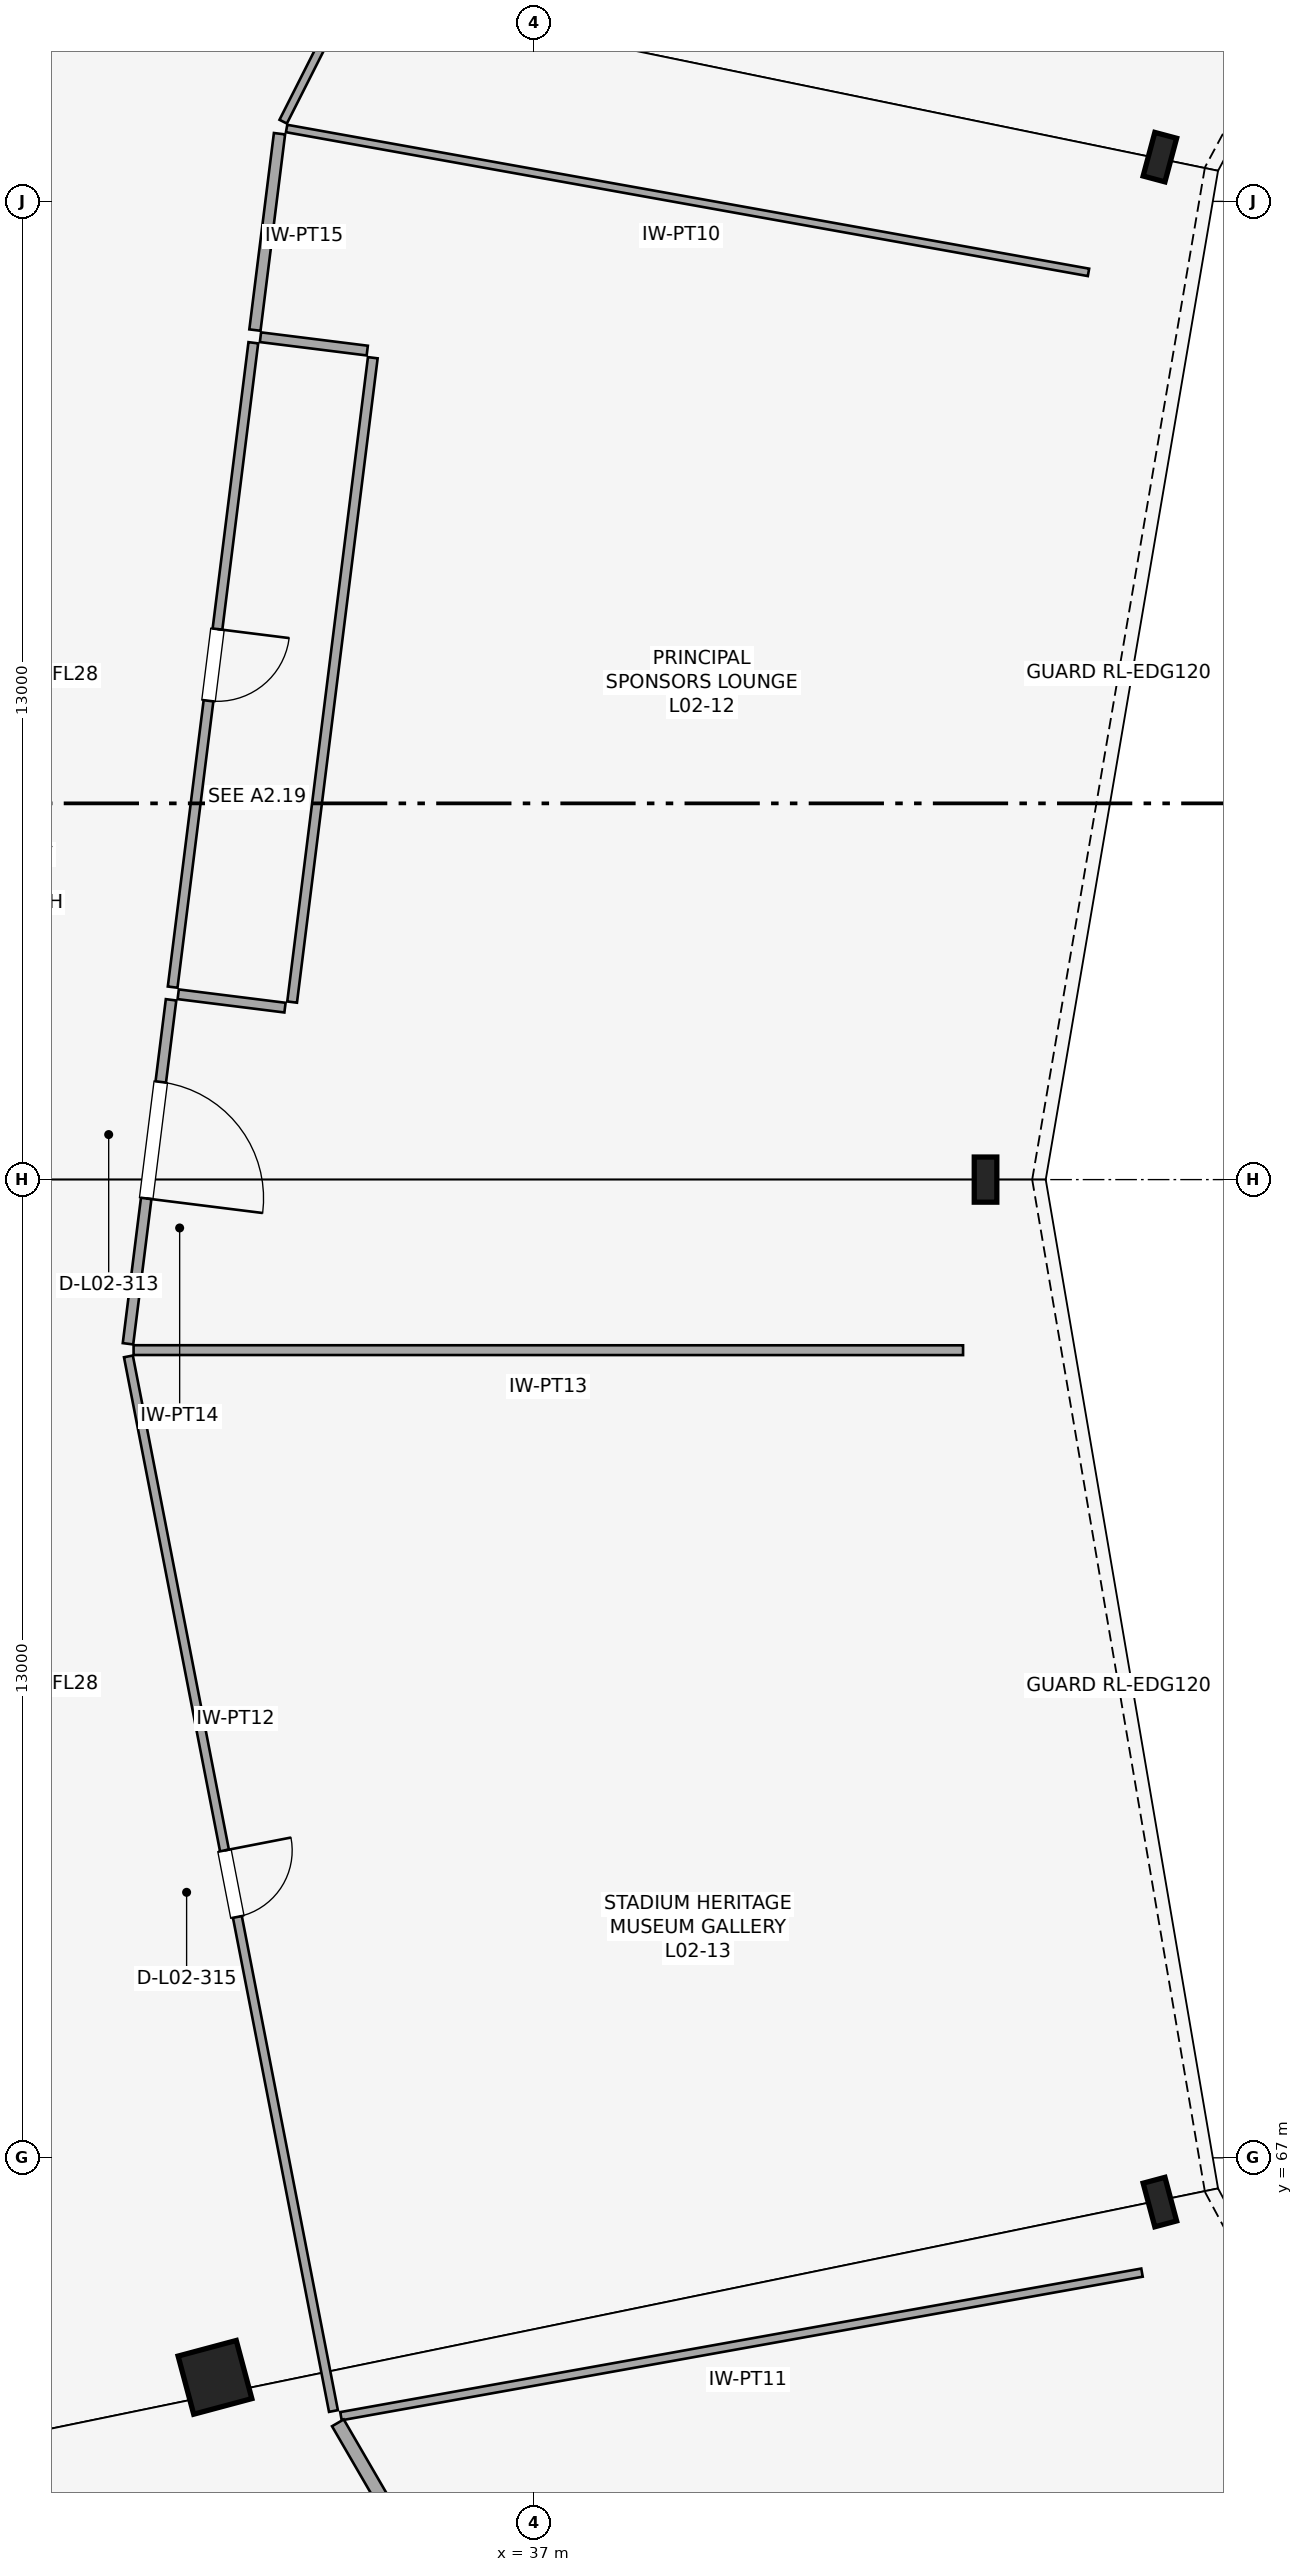
"""IFC4 building model, lengths in metres.
Left out: names, types, materials, properties, quantities, classifications, styles, units other than length and angle.
Written with IfcOpenShell. Run it as: python <this file> out.ifc"""

import sys

from ifc_helpers import new_model, si_unit, direction, frame, frame_2d, origin, origin_2d, place, context, subcontext, project, spatial, rectangle, i_section, extrude, element, fill, save


model = new_model("IFC4")
c1 = context("Model", 3, precision=1e-05, world=origin(), true_north=direction((0.0, 1.0)))
c2 = subcontext(c1, "Body", "Model", "MODEL_VIEW")
j1 = project(units=[si_unit("LENGTHUNIT", "METRE"), si_unit("PLANEANGLEUNIT", "RADIAN")], contexts=[c1])
p1 = place(None, origin())
s1 = spatial("IfcSite", under=j1, at=p1, CompositionType="ELEMENT")
p2 = place(p1, origin())
s2 = spatial("IfcBuilding", under=s1, at=p2, CompositionType="ELEMENT")
p3 = place(p2, frame((0.0, 0.0, 10.6)))
s3 = spatial("IfcBuildingStorey", under=s2, at=p3, CompositionType="ELEMENT", Elevation=10.6)
for number, where, z_axis, x_axis in (
    (1, (45.317, 93.588, 0.0), (0.0, 0.0, 1.0), (-0.966, 0.259, 0.0)),
    (2, (43.0, 80.0, 0.0), (0.0, 0.0, 1.0), (-1.0, 0.0, 0.0)),
    (3, (45.317, 66.412, 0.0), (0.0, 0.0, 1.0), (-0.966, -0.259, 0.0)),
):
    element("IfcColumn", number, at=place(p3, frame(where, z_axis=z_axis, x_axis=x_axis)), inside=s3, PredefinedType="COLUMN", context=c2, shape_type="SweptSolid", body=[
        extrude(i_section(OverallWidth=0.3, OverallDepth=0.6, WebThickness=0.015, FlangeThickness=0.03, FilletRadius=0.027, at=origin_2d()), origin(), (0.0, 0.0, 1.0), 5.0),
    ])
p4 = place(p3, frame((32.76, 64.083, 0.0), z_axis=(0.0, 0.0, 1.0), x_axis=(-0.965925826289, -0.258819045103, 0.0)))
e4 = element("IfcColumn", 4, at=p4, inside=s3, PredefinedType="COLUMN", context=c2, shape_type="SweptSolid", body=[
    extrude(rectangle(XDim=0.8, YDim=0.8, at=origin_2d()), origin(), (0.0, 0.0, 1.0), 5.0),
])
p5 = place(p3, frame((41.445, 109.428, 0.0), z_axis=(0.0, 0.0, 1.0), x_axis=(-0.451596331637, -0.892222367603, 0.0)))
e5 = element("IfcWall", 5, at=p5, inside=s3, PredefinedType="PARTITIONING", context=c2, shape_type="SweptSolid", body=[
    extrude(rectangle(XDim=17.225, YDim=0.11, at=frame_2d((8.613, 0.0))), origin(), (0.0, 0.0, 1.0), 3.47),
])
p6 = place(p5, frame((7.703, 0.0, 0.0)))
e6 = element("IfcOpeningElement", 6, at=p6, cuts=e5, PredefinedType="OPENING", context=c2, shape_type="SweptSolid", body=[
    extrude(rectangle(XDim=1.82, YDim=2.1, at=frame_2d((0.91, 1.05))), frame((0.0, 0.065, 0.0), z_axis=(0.0, -1.0, 0.0), x_axis=(1.0, 0.0, 0.0)), (0.0, 0.0, 1.0), 0.13),
])
p7 = place(p3, frame((44.368, 92.057, 0.0), z_axis=(0.0, 0.0, 1.0), x_axis=(-0.984280053561, 0.176614767675, 0.0)))
e7 = element("IfcWall", 7, at=p7, inside=s3, PredefinedType="PARTITIONING", context=c2, shape_type="SweptSolid", body=[
    extrude(rectangle(XDim=10.826, YDim=0.1, at=frame_2d((5.413, 0.0))), origin(), (0.0, 0.0, 1.0), 3.47),
])
p8 = place(p3, frame((33.27, 91.121, 0.0), z_axis=(0.0, 0.0, 1.0), x_axis=(-0.124247119987, -0.992251305454, 0.0)))
e8 = element("IfcWall", 8, at=p8, inside=s3, PredefinedType="PARTITIONING", context=c2, shape_type="SweptSolid", body=[
    extrude(rectangle(XDim=8.63, YDim=0.13, at=frame_2d((4.315, 0.0))), origin(), (0.0, 0.0, 1.0), 3.47),
])
p9 = place(p8, frame((3.835, 0.0, 0.0)))
e9 = element("IfcOpeningElement", 9, at=p9, cuts=e8, PredefinedType="OPENING", context=c2, shape_type="SweptSolid", body=[
    extrude(rectangle(XDim=0.96, YDim=2.24, at=frame_2d((0.48, 1.12))), frame((0.0, 0.075, 0.0), z_axis=(0.0, -1.0, 0.0), x_axis=(1.0, 0.0, 0.0)), (0.0, 0.0, 1.0), 0.15),
])
p10 = place(p3, frame((34.857, 90.922, 0.0), z_axis=(0.0, 0.0, 1.0), x_axis=(-0.124247119987, -0.992251305454, 0.0)))
e10 = element("IfcWall", 10, at=p10, inside=s3, PredefinedType="PARTITIONING", context=c2, shape_type="SweptSolid", body=[
    extrude(rectangle(XDim=8.63, YDim=0.13, at=frame_2d((4.315, 0.0))), origin(), (0.0, 0.0, 1.0), 3.47),
])
p11 = place(p3, frame((33.365, 91.195, 0.0), z_axis=(0.0, 0.0, 1.0), x_axis=(0.992248962989, -0.124265825745, 0.0)))
e11 = element("IfcWall", 11, at=p11, inside=s3, PredefinedType="PARTITIONING", context=c2, shape_type="SweptSolid", body=[
    extrude(rectangle(XDim=1.43, YDim=0.13, at=frame_2d((0.715, 0.0))), origin(), (0.0, 0.0, 1.0), 3.47),
])
p12 = place(p3, frame((32.271, 82.463, 0.0), z_axis=(0.0, 0.0, 1.0), x_axis=(0.992267366855, -0.124118784533, 0.0)))
e12 = element("IfcWall", 12, at=p12, inside=s3, PredefinedType="PARTITIONING", context=c2, shape_type="SweptSolid", body=[
    extrude(rectangle(XDim=1.43, YDim=0.13, at=frame_2d((0.715, 0.0))), origin(), (0.0, 0.0, 1.0), 3.47),
])
p13 = place(p3, frame((33.618, 93.899, 0.0), z_axis=(0.0, 0.0, 1.0), x_axis=(-0.124206110608, -0.992256439681, 0.0)))
e13 = element("IfcWall", 13, at=p13, inside=s3, PredefinedType="PARTITIONING", context=c2, shape_type="SweptSolid", body=[
    extrude(rectangle(XDim=2.63, YDim=0.15, at=frame_2d((1.315, 0.0))), origin(), (0.0, 0.0, 1.0), 3.47),
])
p14 = place(p3, frame((32.177, 82.389, 0.0), z_axis=(0.0, 0.0, 1.0), x_axis=(-0.124269532661, -0.99224849874, 0.0)))
e14 = element("IfcWall", 14, at=p14, inside=s3, PredefinedType="PARTITIONING", context=c2, shape_type="SweptSolid", body=[
    extrude(rectangle(XDim=4.607, YDim=0.14, at=frame_2d((2.303, 0.0))), origin(), (0.0, 0.0, 1.0), 3.47),
])
p15 = place(p14, frame((1.1, 0.0, 0.0)))
e15 = element("IfcOpeningElement", 15, at=p15, cuts=e14, PredefinedType="OPENING", context=c2, shape_type="SweptSolid", body=[
    extrude(rectangle(XDim=1.56, YDim=2.24, at=frame_2d((0.78, 1.12))), frame((0.0, 0.08, 0.0), z_axis=(0.0, -1.0, 0.0), x_axis=(1.0, 0.0, 0.0)), (0.0, 0.0, 1.0), 0.16),
])
p16 = place(p3, frame((42.701, 77.733, 0.0), z_axis=(0.0, 0.0, 1.0), x_axis=(-0.999999993868, 0.000110741971, 0.0)))
e16 = element("IfcWall", 16, at=p16, inside=s3, PredefinedType="PARTITIONING", context=c2, shape_type="SweptSolid", body=[
    extrude(rectangle(XDim=11.023, YDim=0.13, at=frame_2d((5.511, 0.0))), origin(), (0.0, 0.0, 1.0), 3.47),
])
p17 = place(p3, frame((31.61, 77.65, 0.0), z_axis=(0.0, 0.0, 1.0), x_axis=(0.190845402178, -0.981620105982, 0.0)))
e17 = element("IfcWall", 17, at=p17, inside=s3, PredefinedType="PARTITIONING", context=c2, shape_type="SweptSolid", body=[
    extrude(rectangle(XDim=14.278, YDim=0.12, at=frame_2d((7.139, 0.0))), origin(), (0.0, 0.0, 1.0), 3.47),
])
p18 = place(p17, frame((6.689, 0.0, 0.0)))
e18 = element("IfcOpeningElement", 18, at=p18, cuts=e17, PredefinedType="OPENING", context=c2, shape_type="SweptSolid", body=[
    extrude(rectangle(XDim=0.9, YDim=2.1, at=frame_2d((0.45, 1.05))), frame((0.0, 0.07, 0.0), z_axis=(0.0, -1.0, 0.0), x_axis=(1.0, 0.0, 0.0)), (0.0, 0.0, 1.0), 0.14),
])
p19 = place(p3, frame((45.079, 65.474, 0.0), z_axis=(0.0, 0.0, 1.0), x_axis=(-0.984317575192, -0.176405530436, 0.0)))
e19 = element("IfcWall", 19, at=p19, inside=s3, PredefinedType="PARTITIONING", context=c2, shape_type="SweptSolid", body=[
    extrude(rectangle(XDim=10.814, YDim=0.11, at=frame_2d((5.407, 0.0))), origin(), (0.0, 0.0, 1.0), 3.47),
])
p20 = place(p3, frame((34.393, 63.478, 0.0), z_axis=(0.0, 0.0, 1.0), x_axis=(0.501999042339, -0.864868175788, 0.0)))
e20 = element("IfcWall", 20, at=p20, inside=s3, PredefinedType="PARTITIONING", context=c2, shape_type="SweptSolid", body=[
    extrude(rectangle(XDim=17.048, YDim=0.18, at=frame_2d((8.524, 0.0))), origin(), (0.0, 0.0, 1.0), 3.47),
])
p21 = place(p20, frame((7.744, 0.0, 0.0)))
e21 = element("IfcOpeningElement", 21, at=p21, cuts=e20, PredefinedType="OPENING", context=c2, shape_type="SweptSolid", body=[
    extrude(rectangle(XDim=1.56, YDim=2.38, at=frame_2d((0.78, 1.19))), frame((0.0, 0.1, 0.0), z_axis=(0.0, -1.0, 0.0), x_axis=(1.0, 0.0, 0.0)), (0.0, 0.0, 1.0), 0.2),
])
p22 = place(p9, origin())
e22 = element("IfcDoor", 22, at=p22, inside=s3, OperationType="SINGLE_SWING_LEFT", PredefinedType="DOOR", context=c2, shape_type="SweptSolid", body=[
    extrude(rectangle(XDim=0.96, YDim=2.24, at=frame_2d((0.48, 1.12))), frame((0.0, 0.025, 0.0), z_axis=(0.0, -1.0, 0.0), x_axis=(1.0, 0.0, 0.0)), (0.0, 0.0, 1.0), 0.05),
])
fill(e9, e22)
p23 = place(p15, origin())
e23 = element("IfcDoor", 23, at=p23, inside=s3, OperationType="SINGLE_SWING_RIGHT", PredefinedType="DOOR", context=c2, shape_type="SweptSolid", body=[
    extrude(rectangle(XDim=1.56, YDim=2.24, at=frame_2d((0.78, 1.12))), frame((0.0, 0.025, 0.0), z_axis=(0.0, -1.0, 0.0), x_axis=(1.0, 0.0, 0.0)), (0.0, 0.0, 1.0), 0.05),
])
fill(e15, e23)
p24 = place(p18, origin())
e24 = element("IfcDoor", 24, at=p24, inside=s3, OperationType="SINGLE_SWING_LEFT", PredefinedType="DOOR", context=c2, shape_type="SweptSolid", body=[
    extrude(rectangle(XDim=0.9, YDim=2.1, at=frame_2d((0.45, 1.05))), frame((0.0, 0.025, 0.0), z_axis=(0.0, -1.0, 0.0), x_axis=(1.0, 0.0, 0.0)), (0.0, 0.0, 1.0), 0.05),
])
fill(e18, e24)
save(model, sys.argv[1])
